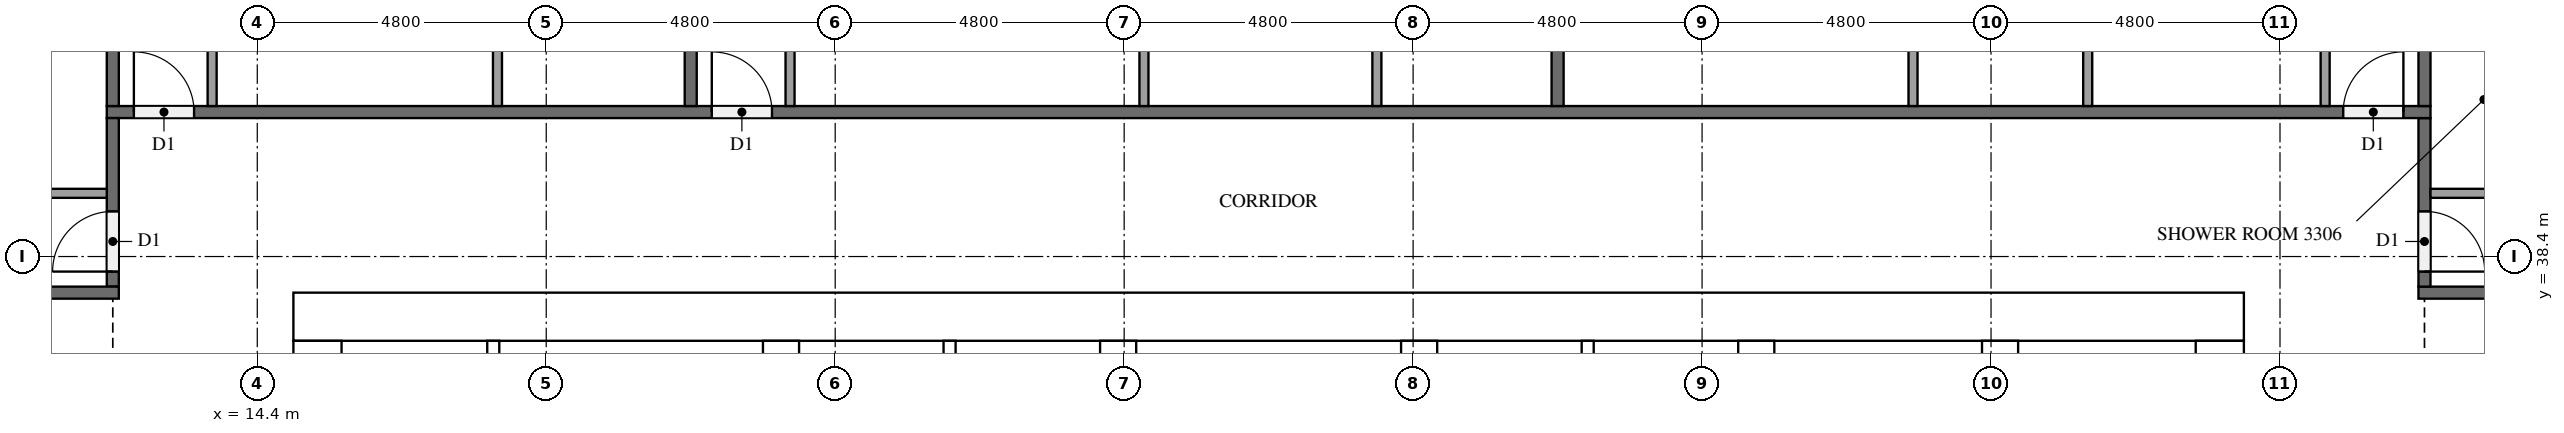
"""IFC4 building model, lengths in metres.
Left out: names, types, materials, properties, quantities, classifications, styles, units other than length and angle.
Written with IfcOpenShell. Run it as: python <this file> out.ifc"""

import sys

from ifc_helpers import new_model, si_unit, direction, frame, frame_2d, origin, place, context, subcontext, project, spatial, rectangle, extrude, element, fill, save


model = new_model("IFC4")
c1 = context("Model", 3, precision=1e-05, world=origin(), true_north=direction((0.0, 1.0)))
c2 = subcontext(c1, "Body", "Model", "MODEL_VIEW")
j1 = project(units=[si_unit("LENGTHUNIT", "METRE"), si_unit("PLANEANGLEUNIT", "RADIAN")], contexts=[c1])
p1 = place(None, origin())
s1 = spatial("IfcSite", under=j1, at=p1, CompositionType="ELEMENT")
p2 = place(p1, origin())
s2 = spatial("IfcBuilding", under=s1, at=p2, CompositionType="ELEMENT")
p3 = place(p2, frame((0.0, 0.0, 129.6)))
s3 = spatial("IfcBuildingStorey", under=s2, at=p3, CompositionType="ELEMENT", Elevation=129.6)
p4 = place(p3, frame((15.0, 37.4, 0.0), z_axis=(0.0, 0.0, 1.0), x_axis=(1.0, 0.0, 0.0)))
e1 = element("IfcWall", 1, at=p4, inside=s3, PredefinedType="SHEAR", context=c2, shape_type="SweptSolid", body=[
    extrude(rectangle(XDim=32.4, YDim=0.8, at=frame_2d((16.2, 0.0))), origin(), (0.0, 0.0, 1.0), 3.2),
])
p5 = place(p4, frame((15.3, 0.0, 0.0)))
e2 = element("IfcOpeningElement", 2, at=p5, cuts=e1, PredefinedType="OPENING", context=c2, shape_type="SweptSolid", body=[
    extrude(rectangle(XDim=1.8, YDim=2.1, at=frame_2d((0.9, 1.05))), frame((0.0, 0.41, 0.0), z_axis=(0.0, -1.0, 0.0), x_axis=(1.0, 0.0, 0.0)), (0.0, 0.0, 1.0), 0.82),
])
p6 = place(p4, frame((1.51, 0.0, 0.0)))
e3 = element("IfcOpeningElement", 3, at=p6, cuts=e1, PredefinedType="OPENING", context=c2, shape_type="SweptSolid", body=[
    extrude(rectangle(XDim=1.0, YDim=2.1, at=frame_2d((0.5, 1.05))), frame((0.0, 0.41, 0.0), z_axis=(0.0, -1.0, 0.0), x_axis=(1.0, 0.0, 0.0)), (0.0, 0.0, 1.0), 0.82),
])
p7 = place(p4, frame((5.11, 0.0, 0.0)))
e4 = element("IfcOpeningElement", 4, at=p7, cuts=e1, PredefinedType="OPENING", context=c2, shape_type="SweptSolid", body=[
    extrude(rectangle(XDim=1.0, YDim=2.1, at=frame_2d((0.5, 1.05))), frame((0.0, 0.41, 0.0), z_axis=(0.0, -1.0, 0.0), x_axis=(1.0, 0.0, 0.0)), (0.0, 0.0, 1.0), 0.82),
])
p8 = place(p3, frame((15.4, 15.8, 0.0), z_axis=(0.0, 0.0, 1.0), x_axis=(0.0, 1.0, 0.0)))
e5 = element("IfcWall", 5, at=p8, inside=s3, PredefinedType="SHEAR", context=c2, shape_type="SweptSolid", body=[
    extrude(rectangle(XDim=21.2, YDim=0.8, at=frame_2d((10.6, 0.0))), origin(), (0.0, 0.0, 1.0), 3.2),
])
p9 = place(p8, frame((4.96, 0.0, 0.0)))
e6 = element("IfcOpeningElement", 6, at=p9, cuts=e5, PredefinedType="OPENING", context=c2, shape_type="SweptSolid", body=[
    extrude(rectangle(XDim=1.2, YDim=2.1, at=frame_2d((0.6, 1.05))), frame((0.0, 0.41, 0.0), z_axis=(0.0, -1.0, 0.0), x_axis=(1.0, 0.0, 0.0)), (0.0, 0.0, 1.0), 0.82),
])
p10 = place(p3, frame((47.0, 15.8, 0.0), z_axis=(0.0, 0.0, 1.0), x_axis=(0.0, 1.0, 0.0)))
e7 = element("IfcWall", 7, at=p10, inside=s3, PredefinedType="SHEAR", context=c2, shape_type="SweptSolid", body=[
    extrude(rectangle(XDim=21.2, YDim=0.8, at=frame_2d((10.6, 0.0))), origin(), (0.0, 0.0, 1.0), 3.2),
])
p11 = place(p10, frame((10.3, 0.0, 0.0)))
e8 = element("IfcOpeningElement", 8, at=p11, cuts=e7, PredefinedType="OPENING", context=c2, shape_type="SweptSolid", body=[
    extrude(rectangle(XDim=1.2, YDim=2.1, at=frame_2d((0.6, 1.05))), frame((0.0, 0.41, 0.0), z_axis=(0.0, -1.0, 0.0), x_axis=(1.0, 0.0, 0.0)), (0.0, 0.0, 1.0), 0.82),
])
p12 = place(p3, frame((23.1, 15.8, 0.0), z_axis=(0.0, 0.0, 1.0), x_axis=(0.0, 1.0, 0.0)))
e9 = element("IfcWall", 9, at=p12, inside=s3, PredefinedType="SHEAR", context=c2, shape_type="SweptSolid", body=[
    extrude(rectangle(XDim=21.2, YDim=0.6, at=frame_2d((10.6, 0.0))), origin(), (0.0, 0.0, 1.0), 3.2),
])
p13 = place(p3, frame((39.3, 27.75, 0.0), z_axis=(0.0, 0.0, 1.0), x_axis=(0.0, 1.0, 0.0)))
e10 = element("IfcWall", 10, at=p13, inside=s3, PredefinedType="SHEAR", context=c2, shape_type="SweptSolid", body=[
    extrude(rectangle(XDim=9.25, YDim=0.6, at=frame_2d((4.625, 0.0))), origin(), (0.0, 0.0, 1.0), 3.2),
])
p14 = place(p3, frame((43.35, 27.75, 0.0), z_axis=(0.0, 0.0, 1.0), x_axis=(0.0, 1.0, 0.0)))
e11 = element("IfcWall", 11, at=p14, inside=s3, PredefinedType="SHEAR", context=c2, shape_type="SweptSolid", body=[
    extrude(rectangle(XDim=9.25, YDim=0.6, at=frame_2d((4.625, 0.0))), origin(), (0.0, 0.0, 1.0), 3.2),
])
p15 = place(p14, frame((7.65, 0.0, 0.0)))
e12 = element("IfcOpeningElement", 12, at=p15, cuts=e11, PredefinedType="OPENING", context=c2, shape_type="SweptSolid", body=[
    extrude(rectangle(XDim=1.2, YDim=2.1, at=frame_2d((0.6, 1.05))), frame((0.0, 0.31, 0.0), z_axis=(0.0, -1.0, 0.0), x_axis=(1.0, 0.0, 0.0)), (0.0, 0.0, 1.0), 0.62),
])
for number, where, z_axis, x_axis in (
    (13, (28.7, 33.85, 0.0), (0.0, 0.0, 1.0), (0.0, 1.0, 0.0)),
    (14, (33.7, 33.85, 0.0), (0.0, 0.0, 1.0), (0.0, 1.0, 0.0)),
):
    element("IfcWall", number, at=place(p3, frame(where, z_axis=z_axis, x_axis=x_axis)), inside=s3, PredefinedType="SHEAR", context=c2, shape_type="SweptSolid", body=[
        extrude(rectangle(XDim=3.15, YDim=0.6, at=frame_2d((1.575, 0.0))), origin(), (0.0, 0.0, 1.0), 3.2),
    ])
for number, where, z_axis, x_axis in (
    (15, (25.9, 33.85, 0.0), (0.0, 0.0, 1.0), (0.0, 1.0, 0.0)),
    (16, (36.5, 33.85, 0.0), (0.0, 0.0, 1.0), (0.0, 1.0, 0.0)),
):
    element("IfcWall", number, at=place(p3, frame(where, z_axis=z_axis, x_axis=x_axis)), inside=s3, PredefinedType="SOLIDWALL", context=c2, shape_type="SweptSolid", body=[
        extrude(rectangle(XDim=3.15, YDim=0.2, at=frame_2d((1.575, 0.0))), origin(), (0.0, 0.0, 1.0), 3.2),
    ])
p16 = place(p3, frame((18.32, 31.55, 0.0), z_axis=(0.0, 0.0, 1.0), x_axis=(0.0, 1.0, 0.0)))
e17 = element("IfcWall", 17, at=p16, inside=s3, PredefinedType="PARTITIONING", context=c2, shape_type="SweptSolid", body=[
    extrude(rectangle(XDim=5.45, YDim=0.2, at=frame_2d((2.725, 0.0))), origin(), (0.0, 0.0, 1.0), 3.2),
])
p17 = place(p3, frame((52.5, 37.8, 0.0), z_axis=(0.0, 0.0, 1.0), x_axis=(-1.0, 0.0, 0.0)))
e18 = element("IfcWall", 18, at=p17, inside=s3, PredefinedType="PARTITIONING", context=c2, shape_type="SweptSolid", body=[
    extrude(rectangle(XDim=2.2, YDim=0.2, at=frame_2d((1.1, 0.0))), origin(), (0.0, 0.0, 1.0), 3.2),
])
p18 = place(p3, frame((50.4, 40.7, 0.0), z_axis=(0.0, 0.0, 1.0), x_axis=(0.0, -1.0, 0.0)))
e19 = element("IfcWall", 19, at=p18, inside=s3, PredefinedType="PARTITIONING", context=c2, shape_type="SweptSolid", body=[
    extrude(rectangle(XDim=2.8, YDim=0.2, at=frame_2d((1.4, 0.0))), origin(), (0.0, 0.0, 1.0), 3.2),
])
p19 = place(p18, frame((1.55, 0.0, 0.0)))
e20 = element("IfcOpeningElement", 20, at=p19, cuts=e19, PredefinedType="OPENING", context=c2, shape_type="SweptSolid", body=[
    extrude(rectangle(XDim=1.0, YDim=2.1, at=frame_2d((0.5, 1.05))), frame((0.0, 0.11, 0.0), z_axis=(0.0, -1.0, 0.0), x_axis=(1.0, 0.0, 0.0)), (0.0, 0.0, 1.0), 0.22),
])
p20 = place(p3, frame((11.9, 40.8, 0.0), z_axis=(0.0, 0.0, 1.0), x_axis=(1.0, 0.0, 0.0)))
e21 = element("IfcWall", 21, at=p20, inside=s3, PredefinedType="PARTITIONING", context=c2, shape_type="SweptSolid", body=[
    extrude(rectangle(XDim=38.6, YDim=0.2, at=frame_2d((19.3, 0.0))), origin(), (0.0, 0.0, 1.0), 3.2),
])
p21 = place(p20, frame((37.15, 0.0, 0.0)))
e22 = element("IfcOpeningElement", 22, at=p21, cuts=e21, PredefinedType="OPENING", context=c2, shape_type="SweptSolid", body=[
    extrude(rectangle(XDim=1.0, YDim=2.1, at=frame_2d((0.5, 1.05))), frame((0.0, 0.11, 0.0), z_axis=(0.0, -1.0, 0.0), x_axis=(1.0, 0.0, 0.0)), (0.0, 0.0, 1.0), 0.22),
])
p22 = place(p20, frame((10.05, 0.0, 0.0)))
e23 = element("IfcOpeningElement", 23, at=p22, cuts=e21, PredefinedType="OPENING", context=c2, shape_type="SweptSolid", body=[
    extrude(rectangle(XDim=1.0, YDim=2.1, at=frame_2d((0.5, 1.05))), frame((0.0, 0.11, 0.0), z_axis=(0.0, -1.0, 0.0), x_axis=(1.0, 0.0, 0.0)), (0.0, 0.0, 1.0), 0.22),
])
p23 = place(p20, frame((0.45, 0.0, 0.0)))
e24 = element("IfcOpeningElement", 24, at=p23, cuts=e21, PredefinedType="OPENING", context=c2, shape_type="SweptSolid", body=[
    extrude(rectangle(XDim=1.0, YDim=2.1, at=frame_2d((0.5, 1.05))), frame((0.0, 0.11, 0.0), z_axis=(0.0, -1.0, 0.0), x_axis=(1.0, 0.0, 0.0)), (0.0, 0.0, 1.0), 0.22),
])
p24 = place(p3, frame((12.0, 37.9, 0.0), z_axis=(0.0, 0.0, 1.0), x_axis=(0.0, 1.0, 0.0)))
e25 = element("IfcWall", 25, at=p24, inside=s3, PredefinedType="PARTITIONING", context=c2, shape_type="SweptSolid", body=[
    extrude(rectangle(XDim=2.8, YDim=0.2, at=frame_2d((1.4, 0.0))), origin(), (0.0, 0.0, 1.0), 3.2),
])
p25 = place(p24, frame((0.25, 0.0, 0.0)))
e26 = element("IfcOpeningElement", 26, at=p25, cuts=e25, PredefinedType="OPENING", context=c2, shape_type="SweptSolid", body=[
    extrude(rectangle(XDim=1.0, YDim=2.1, at=frame_2d((0.5, 1.05))), frame((0.0, 0.11, 0.0), z_axis=(0.0, -1.0, 0.0), x_axis=(1.0, 0.0, 0.0)), (0.0, 0.0, 1.0), 0.22),
])
p26 = place(p3, frame((12.1, 37.8, 0.0), z_axis=(0.0, 0.0, 1.0), x_axis=(-1.0, 0.0, 0.0)))
e27 = element("IfcWall", 27, at=p26, inside=s3, PredefinedType="PARTITIONING", context=c2, shape_type="SweptSolid", body=[
    extrude(rectangle(XDim=2.2, YDim=0.2, at=frame_2d((1.1, 0.0))), origin(), (0.0, 0.0, 1.0), 3.2),
])
for number, where, z_axis, x_axis in (
    (28, (50.4, 40.9, 0.0), (0.0, 0.0, 1.0), (0.0, 1.0, 0.0)),
    (29, (36.0, 52.7, 0.0), (0.0, 0.0, 1.0), (0.0, -1.0, 0.0)),
    (30, (21.6, 52.7, 0.0), (0.0, 0.0, 1.0), (0.0, -1.0, 0.0)),
    (31, (12.0, 52.7, 0.0), (0.0, 0.0, 1.0), (0.0, -1.0, 0.0)),
):
    element("IfcWall", number, at=place(p3, frame(where, z_axis=z_axis, x_axis=x_axis)), inside=s3, PredefinedType="PARTITIONING", context=c2, shape_type="SweptSolid", body=[
        extrude(rectangle(XDim=11.8, YDim=0.2, at=frame_2d((5.9, 0.0))), origin(), (0.0, 0.0, 1.0), 3.2),
    ])
p27 = place(p3, frame((50.5, 39.45, 0.0), z_axis=(0.0, 0.0, 1.0), x_axis=(1.0, 0.0, 0.0)))
e32 = element("IfcWall", 32, at=p27, inside=s3, PredefinedType="PARTITIONING", context=c2, shape_type="SweptSolid", body=[
    extrude(rectangle(XDim=1.925, YDim=0.15, at=frame_2d((0.962, 0.0))), origin(), (0.0, 0.0, 1.0), 3.2),
])
for number, where, z_axis, x_axis in (
    (33, (44.806, 40.9, 0.0), (0.0, 0.0, 1.0), (0.0, 1.0, 0.0)),
    (34, (41.904, 40.9, 0.0), (0.0, 0.0, 1.0), (0.0, 1.0, 0.0)),
):
    element("IfcWall", number, at=place(p3, frame(where, z_axis=z_axis, x_axis=x_axis)), inside=s3, PredefinedType="PARTITIONING", context=c2, shape_type="SweptSolid", body=[
        extrude(rectangle(XDim=4.175, YDim=0.15, at=frame_2d((2.087, 0.0))), origin(), (0.0, 0.0, 1.0), 3.2),
    ])
p28 = place(p3, frame((48.75, 40.9, 0.0), z_axis=(0.0, 0.0, 1.0), x_axis=(0.0, 1.0, 0.0)))
e35 = element("IfcWall", 35, at=p28, inside=s3, PredefinedType="PARTITIONING", context=c2, shape_type="SweptSolid", body=[
    extrude(rectangle(XDim=4.325, YDim=0.15, at=frame_2d((2.163, 0.0))), origin(), (0.0, 0.0, 1.0), 3.2),
])
for number, where, z_axis, x_axis in (
    (36, (29.129, 40.9, 0.0), (0.0, 0.0, 1.0), (0.0, 1.0, 0.0)),
    (37, (32.998, 40.9, 0.0), (0.0, 0.0, 1.0), (0.0, 1.0, 0.0)),
):
    element("IfcWall", number, at=place(p3, frame(where, z_axis=z_axis, x_axis=x_axis)), inside=s3, PredefinedType="PARTITIONING", context=c2, shape_type="SweptSolid", body=[
        extrude(rectangle(XDim=2.975, YDim=0.15, at=frame_2d((1.488, 0.0))), origin(), (0.0, 0.0, 1.0), 3.2),
    ])
p29 = place(p3, frame((23.25, 40.9, 0.0), z_axis=(0.0, 0.0, 1.0), x_axis=(0.0, 1.0, 0.0)))
e38 = element("IfcWall", 38, at=p29, inside=s3, PredefinedType="PARTITIONING", context=c2, shape_type="SweptSolid", body=[
    extrude(rectangle(XDim=3.125, YDim=0.15, at=frame_2d((1.562, 0.0))), origin(), (0.0, 0.0, 1.0), 3.2),
])
p30 = place(p3, frame((18.39, 40.9, 0.0), z_axis=(0.0, 0.0, 1.0), x_axis=(0.0, 1.0, 0.0)))
e39 = element("IfcWall", 39, at=p30, inside=s3, PredefinedType="PARTITIONING", context=c2, shape_type="SweptSolid", body=[
    extrude(rectangle(XDim=3.725, YDim=0.15, at=frame_2d((1.863, 0.0))), origin(), (0.0, 0.0, 1.0), 3.2),
])
p31 = place(p3, frame((13.65, 40.9, 0.0), z_axis=(0.0, 0.0, 1.0), x_axis=(0.0, 1.0, 0.0)))
e40 = element("IfcWall", 40, at=p31, inside=s3, PredefinedType="PARTITIONING", context=c2, shape_type="SweptSolid", body=[
    extrude(rectangle(XDim=3.875, YDim=0.15, at=frame_2d((1.938, 0.0))), origin(), (0.0, 0.0, 1.0), 3.2),
])
p32 = place(p3, frame((11.9, 39.45, 0.0), z_axis=(0.0, 0.0, 1.0), x_axis=(-1.0, 0.0, 0.0)))
e41 = element("IfcWall", 41, at=p32, inside=s3, PredefinedType="PARTITIONING", context=c2, shape_type="SweptSolid", body=[
    extrude(rectangle(XDim=3.425, YDim=0.15, at=frame_2d((1.712, 0.0))), origin(), (0.0, 0.0, 1.0), 3.2),
])
p33 = place(p5, origin())
e42 = element("IfcDoor", 42, at=p33, inside=s3, OperationType="DOUBLE_DOOR_SINGLE_SWING", PredefinedType="DOOR", context=c2, shape_type="SweptSolid", body=[
    extrude(rectangle(XDim=1.8, YDim=2.1, at=frame_2d((0.9, 1.05))), frame((0.0, 0.025, 0.0), z_axis=(0.0, -1.0, 0.0), x_axis=(1.0, 0.0, 0.0)), (0.0, 0.0, 1.0), 0.05),
])
fill(e2, e42)
p34 = place(p6, origin())
e43 = element("IfcDoor", 43, at=p34, inside=s3, OperationType="SINGLE_SWING_RIGHT", PredefinedType="DOOR", context=c2, shape_type="SweptSolid", body=[
    extrude(rectangle(XDim=1.0, YDim=2.1, at=frame_2d((0.5, 1.05))), frame((0.0, 0.025, 0.0), z_axis=(0.0, -1.0, 0.0), x_axis=(1.0, 0.0, 0.0)), (0.0, 0.0, 1.0), 0.05),
])
fill(e3, e43)
p35 = place(p7, origin())
e44 = element("IfcDoor", 44, at=p35, inside=s3, OperationType="SINGLE_SWING_LEFT", PredefinedType="DOOR", context=c2, shape_type="SweptSolid", body=[
    extrude(rectangle(XDim=1.0, YDim=2.1, at=frame_2d((0.5, 1.05))), frame((0.0, 0.025, 0.0), z_axis=(0.0, -1.0, 0.0), x_axis=(1.0, 0.0, 0.0)), (0.0, 0.0, 1.0), 0.05),
])
fill(e4, e44)
p36 = place(p19, origin())
e45 = element("IfcDoor", 45, at=p36, inside=s3, OperationType="SINGLE_SWING_RIGHT", PredefinedType="DOOR", context=c2, shape_type="SweptSolid", body=[
    extrude(rectangle(XDim=1.0, YDim=2.1, at=frame_2d((0.5, 1.05))), frame((0.0, 0.025, 0.0), z_axis=(0.0, -1.0, 0.0), x_axis=(1.0, 0.0, 0.0)), (0.0, 0.0, 1.0), 0.05),
])
fill(e20, e45)
p37 = place(p21, origin())
e46 = element("IfcDoor", 46, at=p37, inside=s3, OperationType="SINGLE_SWING_RIGHT", PredefinedType="DOOR", context=c2, shape_type="SweptSolid", body=[
    extrude(rectangle(XDim=1.0, YDim=2.1, at=frame_2d((0.5, 1.05))), frame((0.0, 0.025, 0.0), z_axis=(0.0, -1.0, 0.0), x_axis=(1.0, 0.0, 0.0)), (0.0, 0.0, 1.0), 0.05),
])
fill(e22, e46)
p38 = place(p22, origin())
e47 = element("IfcDoor", 47, at=p38, inside=s3, OperationType="SINGLE_SWING_LEFT", PredefinedType="DOOR", context=c2, shape_type="SweptSolid", body=[
    extrude(rectangle(XDim=1.0, YDim=2.1, at=frame_2d((0.5, 1.05))), frame((0.0, 0.025, 0.0), z_axis=(0.0, -1.0, 0.0), x_axis=(1.0, 0.0, 0.0)), (0.0, 0.0, 1.0), 0.05),
])
fill(e23, e47)
p39 = place(p23, origin())
e48 = element("IfcDoor", 48, at=p39, inside=s3, OperationType="SINGLE_SWING_LEFT", PredefinedType="DOOR", context=c2, shape_type="SweptSolid", body=[
    extrude(rectangle(XDim=1.0, YDim=2.1, at=frame_2d((0.5, 1.05))), frame((0.0, 0.025, 0.0), z_axis=(0.0, -1.0, 0.0), x_axis=(1.0, 0.0, 0.0)), (0.0, 0.0, 1.0), 0.05),
])
fill(e24, e48)
p40 = place(p25, origin())
e49 = element("IfcDoor", 49, at=p40, inside=s3, OperationType="SINGLE_SWING_LEFT", PredefinedType="DOOR", context=c2, shape_type="SweptSolid", body=[
    extrude(rectangle(XDim=1.0, YDim=2.1, at=frame_2d((0.5, 1.05))), frame((0.0, 0.025, 0.0), z_axis=(0.0, -1.0, 0.0), x_axis=(1.0, 0.0, 0.0)), (0.0, 0.0, 1.0), 0.05),
])
fill(e26, e49)
save(model, sys.argv[1])
